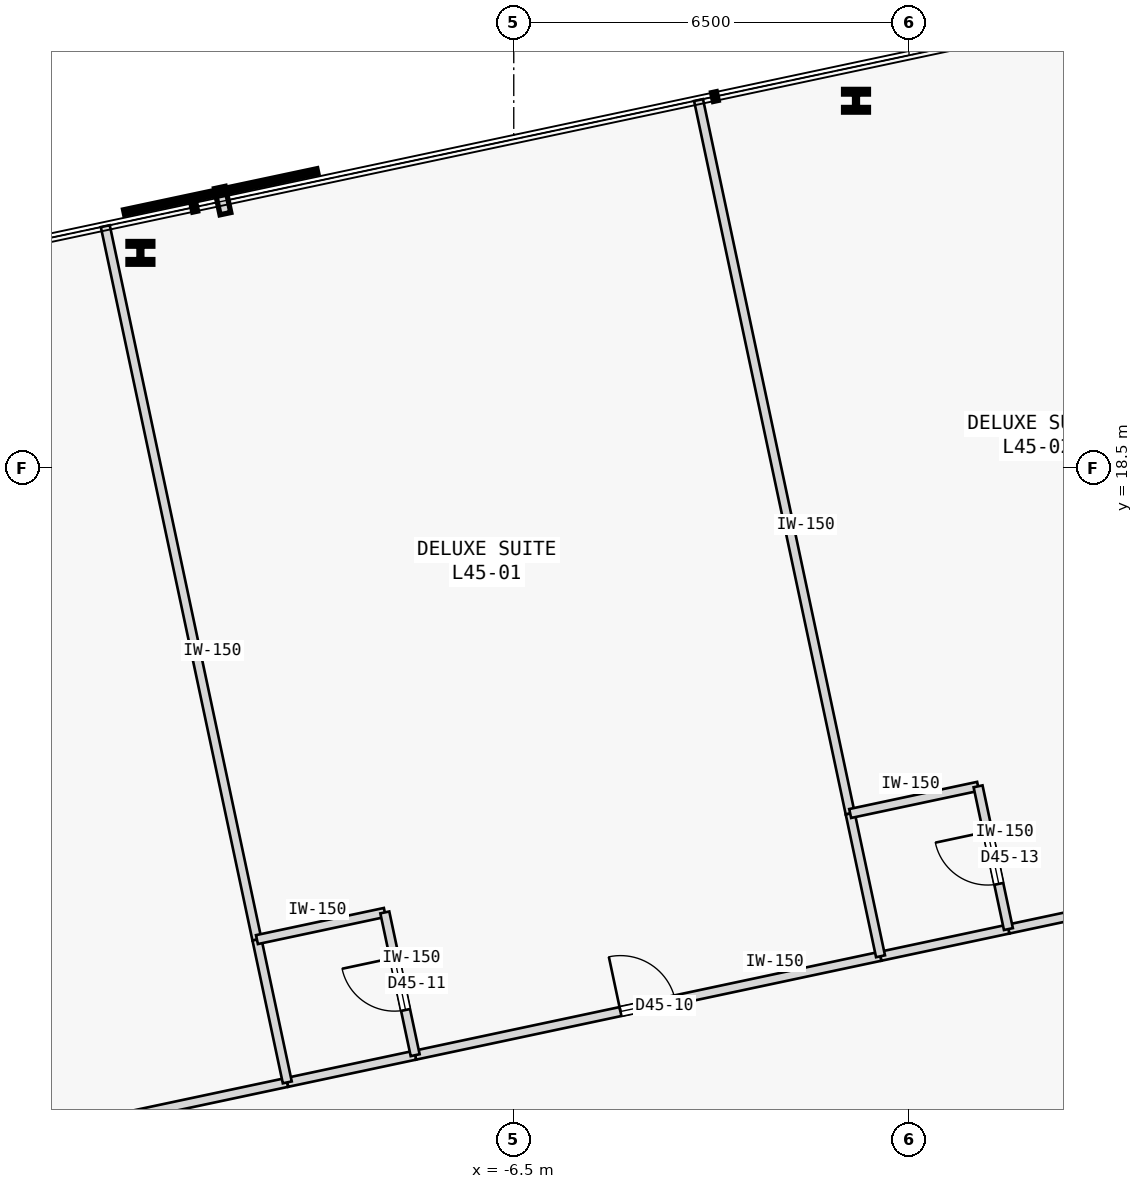
"""IFC4 building model, lengths in metres.
Left out: names, types, materials, properties, quantities, classifications, styles, units other than length and angle.
Written with IfcOpenShell. Run it as: python <this file> out.ifc"""

import sys

from ifc_helpers import new_model, si_unit, direction, frame, frame_2d, origin, origin_2d, place, context, subcontext, project, spatial, rectangle, i_section, extrude, element, fill, save


model = new_model("IFC4")
c1 = context("Model", 3, precision=1e-05, world=origin(), true_north=direction((0.0, 1.0)))
c2 = subcontext(c1, "Body", "Model", "MODEL_VIEW")
j1 = project(units=[si_unit("LENGTHUNIT", "METRE"), si_unit("PLANEANGLEUNIT", "RADIAN")], contexts=[c1])
p1 = place(None, origin())
s1 = spatial("IfcSite", under=j1, at=p1, CompositionType="ELEMENT")
p2 = place(p1, origin())
s2 = spatial("IfcBuilding", under=s1, at=p2, CompositionType="ELEMENT")
p3 = place(p2, frame((0.0, 0.0, 175.2)))
s3 = spatial("IfcBuildingStorey", under=s2, at=p3, CompositionType="ELEMENT", Elevation=175.2)
for number, where, z_axis, x_axis in (
    (1, (-0.872, 24.543, 0.0), (0.0, 0.0, 1.0), (1.0, 0.0, 0.0)),
    (2, (-12.64, 22.042, 0.0), (0.0, 0.0, 1.0), (1.0, 0.0, 0.0)),
):
    element("IfcColumn", number, at=place(p3, frame(where, z_axis=z_axis, x_axis=x_axis)), inside=s3, PredefinedType="COLUMN", context=c2, shape_type="SweptSolid", body=[
        extrude(i_section(OverallWidth=0.409, OverallDepth=0.374, WebThickness=0.048, FlangeThickness=0.077, FilletRadius=0.015, at=origin_2d()), origin(), (0.0, 0.0, 1.0), 3.4),
    ])
p4 = place(p3, frame((-17.162, 6.926, 0.0), z_axis=(0.0, 0.0, 1.0), x_axis=(0.978143627193, 0.207930383978, 0.0)))
e3 = element("IfcWall", 3, at=p4, inside=s3, PredefinedType="PARTITIONING", context=c2, shape_type="SweptSolid", body=[
    extrude(rectangle(XDim=7.093, YDim=0.15, at=frame_2d((3.546, 0.0))), origin(), (0.0, 0.0, 1.0), 3.175),
])
p5 = place(p3, frame((-8.121, 8.848, 0.0), z_axis=(0.0, 0.0, 1.0), x_axis=(0.978146318695, 0.207917722244, 0.0)))
e4 = element("IfcWall", 4, at=p5, inside=s3, PredefinedType="PARTITIONING", context=c2, shape_type="SweptSolid", body=[
    extrude(rectangle(XDim=7.824, YDim=0.15, at=frame_2d((3.912, 0.0))), origin(), (0.0, 0.0, 1.0), 3.175),
])
p6 = place(p5, frame((3.452, 0.0, 0.0)))
e5 = element("IfcOpeningElement", 5, at=p6, cuts=e4, PredefinedType="OPENING", context=c2, shape_type="SweptSolid", body=[
    extrude(rectangle(XDim=0.92, YDim=2.15, at=frame_2d((0.46, 1.075))), frame((0.0, 0.085, 0.0), z_axis=(0.0, -1.0, 0.0), x_axis=(1.0, 0.0, 0.0)), (0.0, 0.0, 1.0), 0.17),
])
p7 = place(p3, frame((-10.224, 8.401, 0.0), z_axis=(0.0, 0.0, 1.0), x_axis=(0.978146728319, 0.207915795165, 0.0)))
e6 = element("IfcWall", 6, at=p7, inside=s3, PredefinedType="PARTITIONING", context=c2, shape_type="SweptSolid", body=[
    extrude(rectangle(XDim=2.15, YDim=0.15, at=frame_2d((1.075, 0.0))), origin(), (0.0, 0.0, 1.0), 3.175),
])
p8 = place(p3, frame((1.635, 10.921, 0.0), z_axis=(0.0, 0.0, 1.0), x_axis=(0.978147881284, 0.207910370927, 0.0)))
e7 = element("IfcWall", 7, at=p8, inside=s3, PredefinedType="PARTITIONING", context=c2, shape_type="SweptSolid", body=[
    extrude(rectangle(XDim=6.449, YDim=0.15, at=frame_2d((3.225, 0.0))), origin(), (0.0, 0.0, 1.0), 3.175),
])
p9 = place(p8, frame((2.764, 0.0, 0.0)))
e8 = element("IfcOpeningElement", 8, at=p9, cuts=e7, PredefinedType="OPENING", context=c2, shape_type="SweptSolid", body=[
    extrude(rectangle(XDim=0.92, YDim=2.15, at=frame_2d((0.46, 1.075))), frame((0.0, 0.085, 0.0), z_axis=(0.0, -1.0, 0.0), x_axis=(1.0, 0.0, 0.0)), (0.0, 0.0, 1.0), 0.17),
])
p10 = place(p3, frame((-0.469, 10.474, 0.0), z_axis=(0.0, 0.0, 1.0), x_axis=(0.978146728319, 0.207915795165, 0.0)))
e9 = element("IfcWall", 9, at=p10, inside=s3, PredefinedType="PARTITIONING", context=c2, shape_type="SweptSolid", body=[
    extrude(rectangle(XDim=2.15, YDim=0.15, at=frame_2d((1.075, 0.0))), origin(), (0.0, 0.0, 1.0), 3.175),
])
p11 = place(p3, frame((-10.723, 10.748, 0.0), z_axis=(0.0, 0.0, 1.0), x_axis=(-0.207914988081, 0.978146899873, 0.0)))
e10 = element("IfcWall", 10, at=p11, inside=s3, PredefinedType="PARTITIONING", context=c2, shape_type="SweptSolid", body=[
    extrude(rectangle(XDim=11.995, YDim=0.15, at=frame_2d((5.998, 0.0))), origin(), (0.0, 0.0, 1.0), 3.175),
])
p12 = place(p3, frame((-10.224, 8.401, 0.0), z_axis=(0.0, 0.0, 1.0), x_axis=(-0.207917150959, 0.978146440129, 0.0)))
e11 = element("IfcWall", 11, at=p12, inside=s3, PredefinedType="PARTITIONING", context=c2, shape_type="SweptSolid", body=[
    extrude(rectangle(XDim=2.4, YDim=0.15, at=frame_2d((1.2, 0.0))), origin(), (0.0, 0.0, 1.0), 3.175),
])
p13 = place(p3, frame((-10.723, 10.748, 0.0), z_axis=(0.0, 0.0, 1.0), x_axis=(0.978146728319, 0.207915795165, 0.0)))
e12 = element("IfcWall", 12, at=p13, inside=s3, PredefinedType="PARTITIONING", context=c2, shape_type="SweptSolid", body=[
    extrude(rectangle(XDim=2.15, YDim=0.15, at=frame_2d((1.075, 0.0))), origin(), (0.0, 0.0, 1.0), 3.175),
])
p14 = place(p3, frame((-8.121, 8.848, 0.0), z_axis=(0.0, 0.0, 1.0), x_axis=(-0.207917150959, 0.978146440129, 0.0)))
e13 = element("IfcWall", 13, at=p14, inside=s3, PredefinedType="PARTITIONING", context=c2, shape_type="SweptSolid", body=[
    extrude(rectangle(XDim=2.4, YDim=0.15, at=frame_2d((1.2, 0.0))), origin(), (0.0, 0.0, 1.0), 3.175),
])
p15 = place(p14, frame((0.76, 0.0, 0.0)))
e14 = element("IfcOpeningElement", 14, at=p15, cuts=e13, PredefinedType="OPENING", context=c2, shape_type="SweptSolid", body=[
    extrude(rectangle(XDim=0.88, YDim=2.15, at=frame_2d((0.44, 1.075))), frame((0.0, 0.085, 0.0), z_axis=(0.0, -1.0, 0.0), x_axis=(1.0, 0.0, 0.0)), (0.0, 0.0, 1.0), 0.17),
])
p16 = place(p3, frame((-0.967, 12.822, 0.0), z_axis=(0.0, 0.0, 1.0), x_axis=(-0.207914988081, 0.978146899873, 0.0)))
e15 = element("IfcWall", 15, at=p16, inside=s3, PredefinedType="PARTITIONING", context=c2, shape_type="SweptSolid", body=[
    extrude(rectangle(XDim=11.995, YDim=0.15, at=frame_2d((5.998, 0.0))), origin(), (0.0, 0.0, 1.0), 3.175),
])
p17 = place(p3, frame((-0.469, 10.474, 0.0), z_axis=(0.0, 0.0, 1.0), x_axis=(-0.207819824493, 0.978167123015, 0.0)))
e16 = element("IfcWall", 16, at=p17, inside=s3, PredefinedType="PARTITIONING", context=c2, shape_type="SweptSolid", body=[
    extrude(rectangle(XDim=2.4, YDim=0.15, at=frame_2d((1.2, 0.0))), origin(), (0.0, 0.0, 1.0), 3.175),
])
p18 = place(p3, frame((-0.967, 12.822, 0.0), z_axis=(0.0, 0.0, 1.0), x_axis=(0.978169816376, 0.207807146966, 0.0)))
e17 = element("IfcWall", 17, at=p18, inside=s3, PredefinedType="PARTITIONING", context=c2, shape_type="SweptSolid", body=[
    extrude(rectangle(XDim=2.15, YDim=0.15, at=frame_2d((1.075, 0.0))), origin(), (0.0, 0.0, 1.0), 3.175),
])
p19 = place(p3, frame((1.635, 10.921, 0.0), z_axis=(0.0, 0.0, 1.0), x_axis=(-0.207840504985, 0.978162729042, 0.0)))
e18 = element("IfcWall", 18, at=p19, inside=s3, PredefinedType="PARTITIONING", context=c2, shape_type="SweptSolid", body=[
    extrude(rectangle(XDim=2.4, YDim=0.15, at=frame_2d((1.2, 0.0))), origin(), (0.0, 0.0, 1.0), 3.175),
])
p20 = place(p19, frame((0.76, 0.0, 0.0)))
e19 = element("IfcOpeningElement", 19, at=p20, cuts=e18, PredefinedType="OPENING", context=c2, shape_type="SweptSolid", body=[
    extrude(rectangle(XDim=0.88, YDim=2.15, at=frame_2d((0.44, 1.075))), frame((0.0, 0.085, 0.0), z_axis=(0.0, -1.0, 0.0), x_axis=(1.0, 0.0, 0.0)), (0.0, 0.0, 1.0), 0.17),
])
p21 = place(p6, origin())
e20 = element("IfcDoor", 20, at=p21, inside=s3, OperationType="SINGLE_SWING_LEFT", PredefinedType="DOOR", context=c2, shape_type="SweptSolid", body=[
    extrude(rectangle(XDim=0.92, YDim=2.15, at=frame_2d((0.46, 1.075))), frame((0.0, 0.025, 0.0), z_axis=(0.0, -1.0, 0.0), x_axis=(1.0, 0.0, 0.0)), (0.0, 0.0, 1.0), 0.05),
])
fill(e5, e20)
p22 = place(p15, origin())
e21 = element("IfcDoor", 21, at=p22, inside=s3, OperationType="SINGLE_SWING_RIGHT", PredefinedType="DOOR", context=c2, shape_type="SweptSolid", body=[
    extrude(rectangle(XDim=0.88, YDim=2.15, at=frame_2d((0.44, 1.075))), frame((0.0, 0.025, 0.0), z_axis=(0.0, -1.0, 0.0), x_axis=(1.0, 0.0, 0.0)), (0.0, 0.0, 1.0), 0.05),
])
fill(e14, e21)
p23 = place(p20, origin())
e22 = element("IfcDoor", 22, at=p23, inside=s3, OperationType="SINGLE_SWING_RIGHT", PredefinedType="DOOR", context=c2, shape_type="SweptSolid", body=[
    extrude(rectangle(XDim=0.88, YDim=2.15, at=frame_2d((0.44, 1.075))), frame((0.0, 0.025, 0.0), z_axis=(0.0, -1.0, 0.0), x_axis=(1.0, 0.0, 0.0)), (0.0, 0.0, 1.0), 0.05),
])
fill(e19, e22)
save(model, sys.argv[1])
